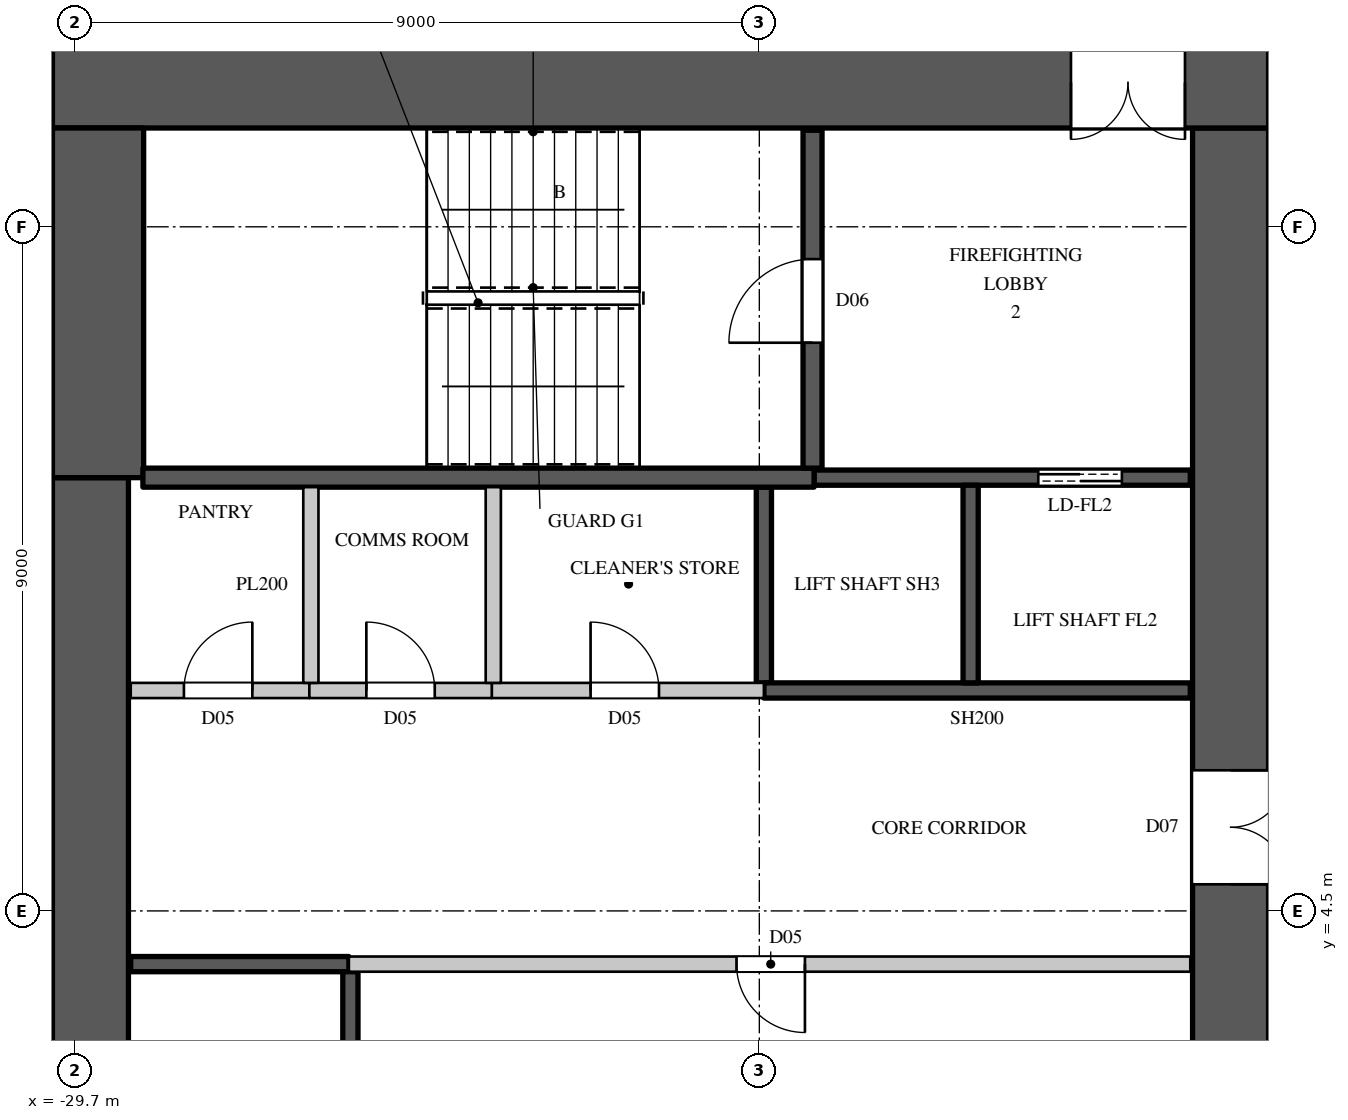
"""IFC4 building model, lengths in metres.
Left out: names, types, materials, properties, quantities, classifications, styles, units other than length and angle.
Written with IfcOpenShell. Run it as: python <this file> out.ifc"""

import sys

from ifc_helpers import new_model, si_unit, direction, frame, frame_2d, origin, place, context, subcontext, project, spatial, rectangle, extrude, element, fill, save


model = new_model("IFC4")
c1 = context("Model", 3, precision=1e-05, world=origin(), true_north=direction((0.0, 1.0)))
c2 = subcontext(c1, "Body", "Model", "MODEL_VIEW")
j1 = project(units=[si_unit("LENGTHUNIT", "METRE"), si_unit("PLANEANGLEUNIT", "RADIAN")], contexts=[c1])
p1 = place(None, origin())
s1 = spatial("IfcSite", under=j1, at=p1, CompositionType="ELEMENT")
p2 = place(p1, origin())
s2 = spatial("IfcBuilding", under=s1, at=p2, CompositionType="ELEMENT")
p3 = place(p2, frame((0.0, 0.0, 109.5)))
s3 = spatial("IfcBuildingStorey", under=s2, at=p3, CompositionType="ELEMENT", Elevation=109.5)
p4 = place(p3, frame((-30.0, 15.4, 0.0), z_axis=(0.0, 0.0, 1.0), x_axis=(1.0, 0.0, 0.0)))
e1 = element("IfcWall", 1, at=p4, inside=s3, PredefinedType="SHEAR", context=c2, shape_type="SweptSolid", body=[
    extrude(rectangle(XDim=16.0, YDim=1.2, at=frame_2d((8.0, 0.0))), origin(), (0.0, 0.0, 1.0), 3.6),
])
p5 = place(p4, frame((13.4, 0.0, 0.0)))
e2 = element("IfcOpeningElement", 2, at=p5, cuts=e1, PredefinedType="OPENING", context=c2, shape_type="SweptSolid", body=[
    extrude(rectangle(XDim=1.5, YDim=2.4, at=frame_2d((0.75, 1.2))), frame((0.0, 0.61, 0.0), z_axis=(0.0, -1.0, 0.0), x_axis=(1.0, 0.0, 0.0)), (0.0, 0.0, 1.0), 1.22),
])
p6 = place(p3, frame((-14.5, -14.8, 0.0), z_axis=(0.0, 0.0, 1.0), x_axis=(0.0, 1.0, 0.0)))
e3 = element("IfcWall", 3, at=p6, inside=s3, PredefinedType="SHEAR", context=c2, shape_type="SweptSolid", body=[
    extrude(rectangle(XDim=29.6, YDim=1.0, at=frame_2d((14.8, 0.0))), origin(), (0.0, 0.0, 1.0), 3.6),
])
p7 = place(p6, frame((8.45, 0.0, 0.0)))
e4 = element("IfcOpeningElement", 4, at=p7, cuts=e3, PredefinedType="OPENING", context=c2, shape_type="SweptSolid", body=[
    extrude(rectangle(XDim=1.5, YDim=2.4, at=frame_2d((0.75, 1.2))), frame((0.0, 0.51, 0.0), z_axis=(0.0, -1.0, 0.0), x_axis=(1.0, 0.0, 0.0)), (0.0, 0.0, 1.0), 1.02),
])
p8 = place(p6, frame((19.65, 0.0, 0.0)))
e5 = element("IfcOpeningElement", 5, at=p8, cuts=e3, PredefinedType="OPENING", context=c2, shape_type="SweptSolid", body=[
    extrude(rectangle(XDim=1.5, YDim=2.4, at=frame_2d((0.75, 1.2))), frame((0.0, 0.51, 0.0), z_axis=(0.0, -1.0, 0.0), x_axis=(1.0, 0.0, 0.0)), (0.0, 0.0, 1.0), 1.02),
])
p9 = place(p6, frame((14.5, 0.0, 0.0)))
e6 = element("IfcOpeningElement", 6, at=p9, cuts=e3, PredefinedType="OPENING", context=c2, shape_type="SweptSolid", body=[
    extrude(rectangle(XDim=0.6, YDim=2.0, at=frame_2d((0.3, 1.0))), frame((0.0, 0.51, 0.0), z_axis=(0.0, -1.0, 0.0), x_axis=(1.0, 0.0, 0.0)), (0.0, 0.0, 1.0), 1.02),
])
p10 = place(p3, frame((-29.5, -10.2, 0.0), z_axis=(0.0, 0.0, 1.0), x_axis=(0.0, 1.0, 0.0)))
e7 = element("IfcWall", 7, at=p10, inside=s3, PredefinedType="SHEAR", context=c2, shape_type="SweptSolid", body=[
    extrude(rectangle(XDim=20.4, YDim=1.0, at=frame_2d((10.2, 0.0))), origin(), (0.0, 0.0, 1.0), 3.6),
])
p11 = place(p3, frame((-29.4, 10.2, 0.0), z_axis=(0.0, 0.0, 1.0), x_axis=(0.0, 1.0, 0.0)))
e8 = element("IfcWall", 8, at=p11, inside=s3, PredefinedType="SHEAR", context=c2, shape_type="SweptSolid", body=[
    extrude(rectangle(XDim=4.6, YDim=1.2, at=frame_2d((2.3, 0.0))), origin(), (0.0, 0.0, 1.0), 3.6),
])
p12 = place(p3, frame((-28.97, 7.4, 0.0), z_axis=(0.0, 0.0, 1.0), x_axis=(1.0, 0.0, 0.0)))
e9 = element("IfcWall", 9, at=p12, inside=s3, PredefinedType="PARTITIONING", context=c2, shape_type="SweptSolid", body=[
    extrude(rectangle(XDim=2.35, YDim=0.2, at=frame_2d((1.175, 0.0))), origin(), (0.0, 0.0, 1.0), 3.3),
])
p13 = place(p12, frame((0.7, 0.0, 0.0)))
e10 = element("IfcOpeningElement", 10, at=p13, cuts=e9, PredefinedType="OPENING", context=c2, shape_type="SweptSolid", body=[
    extrude(rectangle(XDim=0.9, YDim=2.2, at=frame_2d((0.45, 1.1))), frame((0.0, 0.11, 0.0), z_axis=(0.0, -1.0, 0.0), x_axis=(1.0, 0.0, 0.0)), (0.0, 0.0, 1.0), 0.22),
])
p14 = place(p3, frame((-26.1, 3.8, 0.0), z_axis=(0.0, 0.0, 1.0), x_axis=(1.0, 0.0, 0.0)))
e11 = element("IfcWall", 11, at=p14, inside=s3, PredefinedType="PARTITIONING", context=c2, shape_type="SweptSolid", body=[
    extrude(rectangle(XDim=11.07, YDim=0.2, at=frame_2d((5.535, 0.0))), origin(), (0.0, 0.0, 1.0), 3.3),
])
p15 = place(p14, frame((5.1, 0.0, 0.0)))
e12 = element("IfcOpeningElement", 12, at=p15, cuts=e11, PredefinedType="OPENING", context=c2, shape_type="SweptSolid", body=[
    extrude(rectangle(XDim=0.9, YDim=2.2, at=frame_2d((0.45, 1.1))), frame((0.0, 0.11, 0.0), z_axis=(0.0, -1.0, 0.0), x_axis=(1.0, 0.0, 0.0)), (0.0, 0.0, 1.0), 0.22),
])
p16 = place(p3, frame((-24.22, 7.4, 0.0), z_axis=(0.0, 0.0, 1.0), x_axis=(1.0, 0.0, 0.0)))
e13 = element("IfcWall", 13, at=p16, inside=s3, PredefinedType="PARTITIONING", context=c2, shape_type="SweptSolid", body=[
    extrude(rectangle(XDim=3.58, YDim=0.2, at=frame_2d((1.79, 0.0))), origin(), (0.0, 0.0, 1.0), 3.3),
])
p17 = place(p16, frame((1.3, 0.0, 0.0)))
e14 = element("IfcOpeningElement", 14, at=p17, cuts=e13, PredefinedType="OPENING", context=c2, shape_type="SweptSolid", body=[
    extrude(rectangle(XDim=0.9, YDim=2.2, at=frame_2d((0.45, 1.1))), frame((0.0, 0.11, 0.0), z_axis=(0.0, -1.0, 0.0), x_axis=(1.0, 0.0, 0.0)), (0.0, 0.0, 1.0), 0.22),
])
p18 = place(p3, frame((-26.62, 7.4, 0.0), z_axis=(0.0, 0.0, 1.0), x_axis=(1.0, 0.0, 0.0)))
e15 = element("IfcWall", 15, at=p18, inside=s3, PredefinedType="PARTITIONING", context=c2, shape_type="SweptSolid", body=[
    extrude(rectangle(XDim=2.4, YDim=0.2, at=frame_2d((1.2, 0.0))), origin(), (0.0, 0.0, 1.0), 3.3),
])
p19 = place(p18, frame((0.75, 0.0, 0.0)))
e16 = element("IfcOpeningElement", 16, at=p19, cuts=e15, PredefinedType="OPENING", context=c2, shape_type="SweptSolid", body=[
    extrude(rectangle(XDim=0.9, YDim=2.2, at=frame_2d((0.45, 1.1))), frame((0.0, 0.11, 0.0), z_axis=(0.0, -1.0, 0.0), x_axis=(1.0, 0.0, 0.0)), (0.0, 0.0, 1.0), 0.22),
])
for number, where, z_axis, x_axis in (
    (17, (-26.6, 7.5, 0.0), (0.0, 0.0, 1.0), (0.0, 1.0, 0.0)),
    (18, (-24.2, 7.5, 0.0), (0.0, 0.0, 1.0), (0.0, 1.0, 0.0)),
):
    element("IfcWall", number, at=place(p3, frame(where, z_axis=z_axis, x_axis=x_axis)), inside=s3, PredefinedType="PARTITIONING", context=c2, shape_type="SweptSolid", body=[
        extrude(rectangle(XDim=2.575, YDim=0.2, at=frame_2d((1.288, 0.0))), origin(), (0.0, 0.0, 1.0), 3.3),
    ])
p20 = place(p3, frame((-28.97, 3.8, 0.0), z_axis=(0.0, 0.0, 1.0), x_axis=(1.0, 0.0, 0.0)))
e19 = element("IfcWall", 19, at=p20, inside=s3, PredefinedType="SHEAR", context=c2, shape_type="SweptSolid", body=[
    extrude(rectangle(XDim=2.87, YDim=0.2, at=frame_2d((1.435, 0.0))), origin(), (0.0, 0.0, 1.0), 3.3),
])
p21 = place(p3, frame((-26.08, 1.1, 0.0), z_axis=(0.0, 0.0, 1.0), x_axis=(0.0, 1.0, 0.0)))
e20 = element("IfcWall", 20, at=p21, inside=s3, PredefinedType="SHEAR", context=c2, shape_type="SweptSolid", body=[
    extrude(rectangle(XDim=2.6, YDim=0.2, at=frame_2d((1.3, 0.0))), origin(), (0.0, 0.0, 1.0), 3.3),
])
p22 = place(p3, frame((-20.64, 7.5, 0.0), z_axis=(0.0, 0.0, 1.0), x_axis=(0.0, 1.0, 0.0)))
e21 = element("IfcWall", 21, at=p22, inside=s3, PredefinedType="SHEAR", context=c2, shape_type="SweptSolid", body=[
    extrude(rectangle(XDim=2.575, YDim=0.2, at=frame_2d((1.288, 0.0))), origin(), (0.0, 0.0, 1.0), 3.3),
])
p23 = place(p3, frame((-20.64, 7.4, 0.0), z_axis=(0.0, 0.0, 1.0), x_axis=(1.0, 0.0, 0.0)))
e22 = element("IfcWall", 22, at=p23, inside=s3, PredefinedType="SHEAR", context=c2, shape_type="SweptSolid", body=[
    extrude(rectangle(XDim=5.61, YDim=0.2, at=frame_2d((2.805, 0.0))), origin(), (0.0, 0.0, 1.0), 3.3),
])
p24 = place(p3, frame((-19.98, 10.2, 0.0), z_axis=(0.0, 0.0, 1.0), x_axis=(1.0, 0.0, 0.0)))
e23 = element("IfcWall", 23, at=p24, inside=s3, PredefinedType="SHEAR", context=c2, shape_type="SweptSolid", body=[
    extrude(rectangle(XDim=4.95, YDim=0.2, at=frame_2d((2.475, 0.0))), origin(), (0.0, 0.0, 1.0), 3.3),
])
p25 = place(p24, frame((2.95, 0.0, 0.0)))
e24 = element("IfcOpeningElement", 24, at=p25, cuts=e23, PredefinedType="OPENING", context=c2, shape_type="SweptSolid", body=[
    extrude(rectangle(XDim=1.1, YDim=2.2, at=frame_2d((0.55, 1.1))), frame((0.0, 0.11, 0.0), z_axis=(0.0, -1.0, 0.0), x_axis=(1.0, 0.0, 0.0)), (0.0, 0.0, 1.0), 0.22),
])
p26 = place(p3, frame((-17.92, 7.5, 0.0), z_axis=(0.0, 0.0, 1.0), x_axis=(0.0, 1.0, 0.0)))
e25 = element("IfcWall", 25, at=p26, inside=s3, PredefinedType="SHEAR", context=c2, shape_type="SweptSolid", body=[
    extrude(rectangle(XDim=2.6, YDim=0.2, at=frame_2d((1.3, 0.0))), origin(), (0.0, 0.0, 1.0), 3.6),
])
p27 = place(p3, frame((-28.81, 10.2, 0.0), z_axis=(0.0, 0.0, 1.0), x_axis=(1.0, 0.0, 0.0)))
e26 = element("IfcWall", 26, at=p27, inside=s3, PredefinedType="SHEAR", context=c2, shape_type="SweptSolid", body=[
    extrude(rectangle(XDim=8.83, YDim=0.25, at=frame_2d((4.415, 0.0))), origin(), (0.0, 0.0, 1.0), 3.3),
])
p28 = place(p3, frame((-20.0, 10.325, 0.0), z_axis=(0.0, 0.0, 1.0), x_axis=(0.0, 1.0, 0.0)))
e27 = element("IfcWall", 27, at=p28, inside=s3, PredefinedType="SHEAR", context=c2, shape_type="SweptSolid", body=[
    extrude(rectangle(XDim=4.445, YDim=0.25, at=frame_2d((2.223, 0.0))), origin(), (0.0, 0.0, 1.0), 3.3),
])
p29 = place(p28, frame((1.65, 0.0, 0.0)))
e28 = element("IfcOpeningElement", 28, at=p29, cuts=e27, PredefinedType="OPENING", context=c2, shape_type="SweptSolid", body=[
    extrude(rectangle(XDim=1.1, YDim=2.2, at=frame_2d((0.55, 1.1))), frame((0.0, 0.135, 0.0), z_axis=(0.0, -1.0, 0.0), x_axis=(1.0, 0.0, 0.0)), (0.0, 0.0, 1.0), 0.27),
])
p30 = place(p29, origin())
e29 = element("IfcDoor", 29, at=p30, inside=s3, OperationType="SINGLE_SWING_LEFT", PredefinedType="DOOR", context=c2, shape_type="SweptSolid", body=[
    extrude(rectangle(XDim=1.1, YDim=2.2, at=frame_2d((0.55, 1.1))), frame((0.0, 0.025, 0.0), z_axis=(0.0, -1.0, 0.0), x_axis=(1.0, 0.0, 0.0)), (0.0, 0.0, 1.0), 0.05),
])
fill(e28, e29)
p31 = place(p15, origin())
e30 = element("IfcDoor", 30, at=p31, inside=s3, OperationType="SINGLE_SWING_LEFT", PredefinedType="DOOR", context=c2, shape_type="SweptSolid", body=[
    extrude(rectangle(XDim=0.9, YDim=2.2, at=frame_2d((0.45, 1.1))), frame((0.0, 0.025, 0.0), z_axis=(0.0, -1.0, 0.0), x_axis=(1.0, 0.0, 0.0)), (0.0, 0.0, 1.0), 0.05),
])
fill(e12, e30)
p32 = place(p13, origin())
e31 = element("IfcDoor", 31, at=p32, inside=s3, OperationType="SINGLE_SWING_RIGHT", PredefinedType="DOOR", context=c2, shape_type="SweptSolid", body=[
    extrude(rectangle(XDim=0.9, YDim=2.2, at=frame_2d((0.45, 1.1))), frame((0.0, 0.025, 0.0), z_axis=(0.0, -1.0, 0.0), x_axis=(1.0, 0.0, 0.0)), (0.0, 0.0, 1.0), 0.05),
])
fill(e10, e31)
p33 = place(p19, origin())
e32 = element("IfcDoor", 32, at=p33, inside=s3, OperationType="SINGLE_SWING_LEFT", PredefinedType="DOOR", context=c2, shape_type="SweptSolid", body=[
    extrude(rectangle(XDim=0.9, YDim=2.2, at=frame_2d((0.45, 1.1))), frame((0.0, 0.025, 0.0), z_axis=(0.0, -1.0, 0.0), x_axis=(1.0, 0.0, 0.0)), (0.0, 0.0, 1.0), 0.05),
])
fill(e16, e32)
p34 = place(p17, origin())
e33 = element("IfcDoor", 33, at=p34, inside=s3, OperationType="SINGLE_SWING_LEFT", PredefinedType="DOOR", context=c2, shape_type="SweptSolid", body=[
    extrude(rectangle(XDim=0.9, YDim=2.2, at=frame_2d((0.45, 1.1))), frame((0.0, 0.025, 0.0), z_axis=(0.0, -1.0, 0.0), x_axis=(1.0, 0.0, 0.0)), (0.0, 0.0, 1.0), 0.05),
])
fill(e14, e33)
p35 = place(p25, origin())
e34 = element("IfcDoor", 34, at=p35, inside=s3, OperationType="DOUBLE_DOOR_SLIDING", PredefinedType="DOOR", context=c2, shape_type="SweptSolid", body=[
    extrude(rectangle(XDim=1.1, YDim=2.2, at=frame_2d((0.55, 1.1))), frame((0.0, 0.025, 0.0), z_axis=(0.0, -1.0, 0.0), x_axis=(1.0, 0.0, 0.0)), (0.0, 0.0, 1.0), 0.05),
])
fill(e24, e34)
p36 = place(p5, origin())
e35 = element("IfcDoor", 35, at=p36, inside=s3, OperationType="DOUBLE_DOOR_SINGLE_SWING", PredefinedType="DOOR", context=c2, shape_type="SweptSolid", body=[
    extrude(rectangle(XDim=1.5, YDim=2.4, at=frame_2d((0.75, 1.2))), frame((0.0, 0.025, 0.0), z_axis=(0.0, -1.0, 0.0), x_axis=(1.0, 0.0, 0.0)), (0.0, 0.0, 1.0), 0.05),
])
fill(e2, e35)
p37 = place(p8, origin())
e36 = element("IfcDoor", 36, at=p37, inside=s3, OperationType="DOUBLE_DOOR_SINGLE_SWING", PredefinedType="DOOR", context=c2, shape_type="SweptSolid", body=[
    extrude(rectangle(XDim=1.5, YDim=2.4, at=frame_2d((0.75, 1.2))), frame((0.0, -0.445, 0.0), z_axis=(0.0, -1.0, 0.0), x_axis=(1.0, 0.0, 0.0)), (0.0, 0.0, 1.0), 0.05),
])
fill(e5, e36)
save(model, sys.argv[1])
